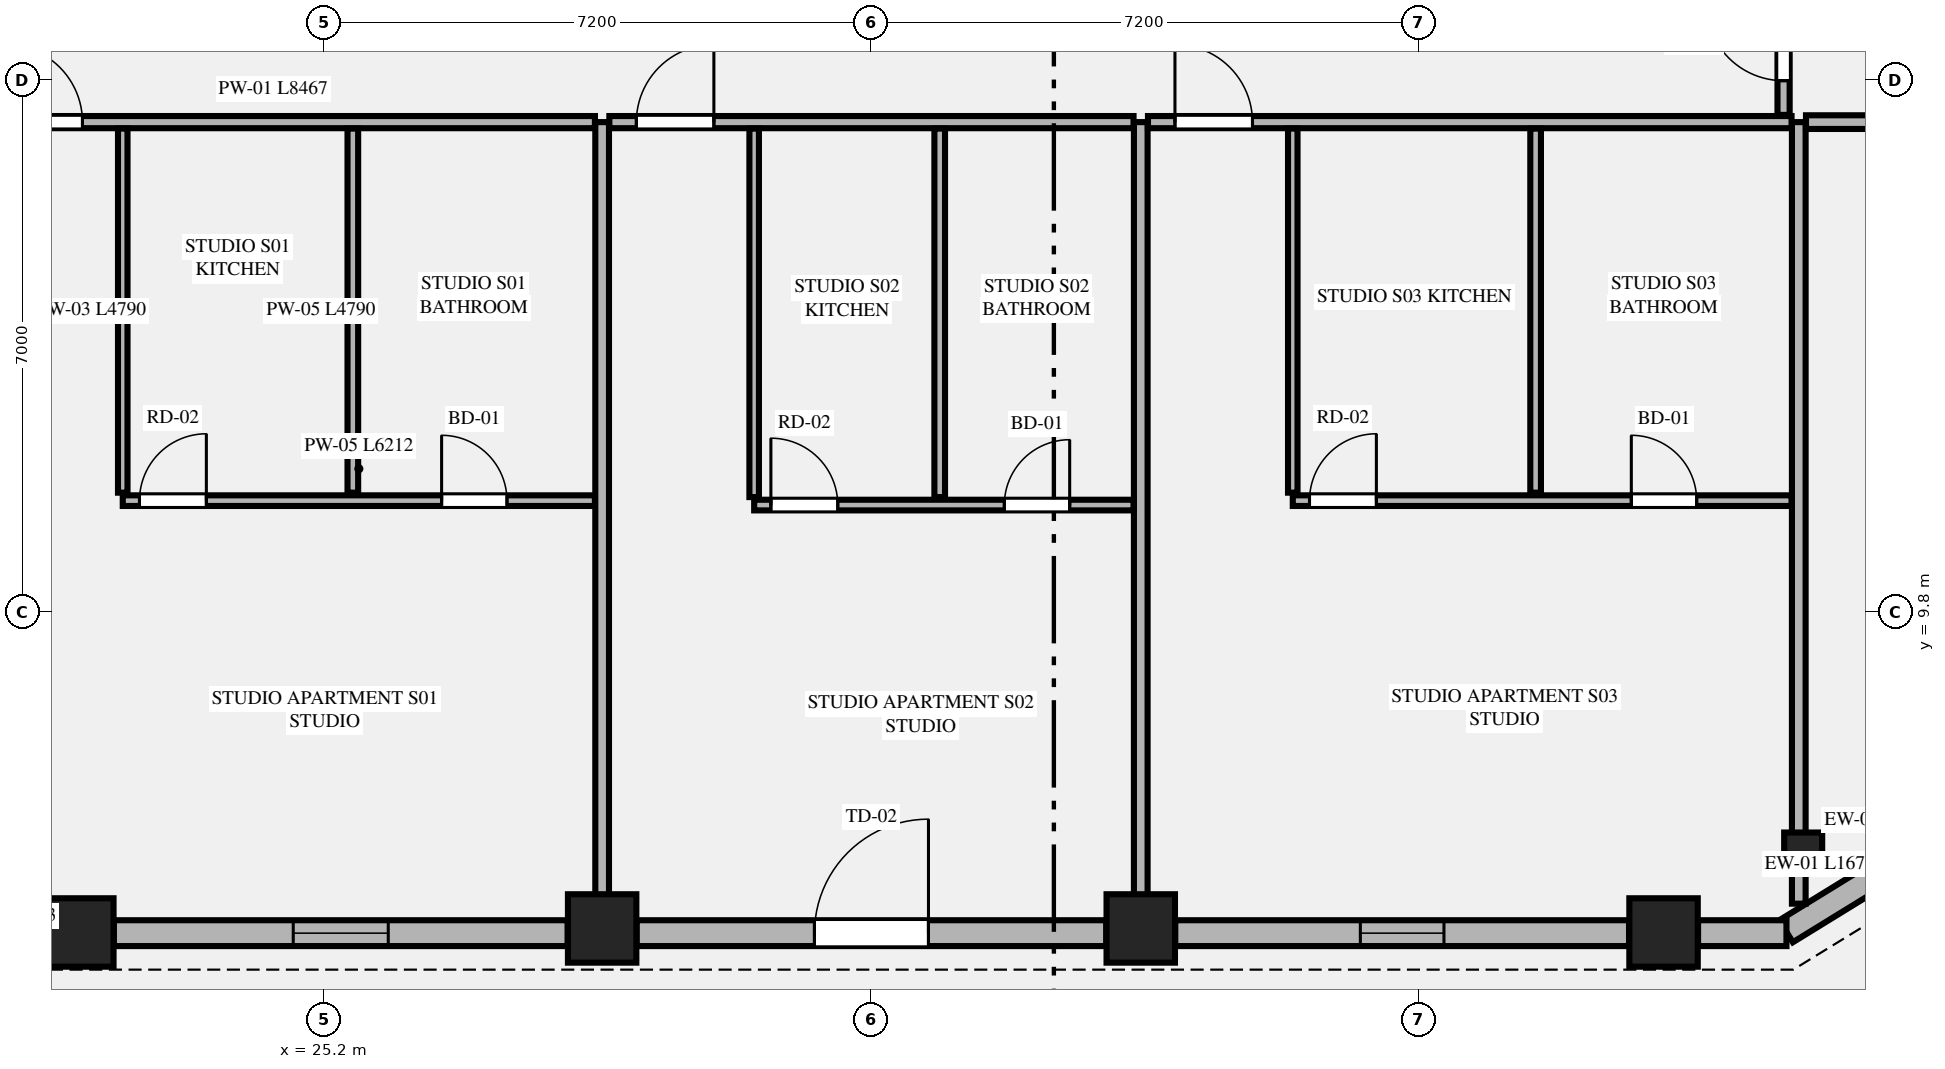
"""IFC4 building model, lengths in metres.
Left out: names, types, materials, properties, quantities, classifications, styles, units other than length and angle.
Written with IfcOpenShell. Run it as: python <this file> out.ifc"""

import sys

from ifc_helpers import new_model, si_unit, direction, frame, frame_2d, origin, origin_2d, place, context, subcontext, project, spatial, rectangle, extrude, element, fill, save


model = new_model("IFC4")
c1 = context("Model", 3, precision=1e-05, world=origin(), true_north=direction((0.0, 1.0)))
c2 = subcontext(c1, "Body", "Model", "MODEL_VIEW")
j1 = project(units=[si_unit("LENGTHUNIT", "METRE"), si_unit("PLANEANGLEUNIT", "RADIAN")], contexts=[c1])
p1 = place(None, origin())
s1 = spatial("IfcSite", under=j1, at=p1, CompositionType="ELEMENT")
p2 = place(p1, origin())
s2 = spatial("IfcBuilding", under=s1, at=p2, CompositionType="ELEMENT")
p3 = place(p2, frame((0.0, 0.0, 171.9)))
s3 = spatial("IfcBuildingStorey", under=s2, at=p3, CompositionType="ELEMENT", Elevation=171.9)
for number, where, z_axis, x_axis in (
    (1, (21.979, 5.589, 0.0), (0.0, 0.0, 1.0), (1.0, 0.0, 0.0)),
    (2, (28.857, 5.642, 0.0), (0.0, 0.0, 1.0), (1.0, 0.0, 0.0)),
    (3, (35.943, 5.642, 0.0), (0.0, 0.0, 1.0), (1.0, 0.0, 0.0)),
    (4, (42.821, 5.589, 0.0), (0.0, 0.0, 1.0), (1.0, 0.0, 0.0)),
):
    element("IfcColumn", number, at=place(p3, frame(where, z_axis=z_axis, x_axis=x_axis)), inside=s3, PredefinedType="COLUMN", context=c2, shape_type="SweptSolid", body=[
        extrude(rectangle(XDim=0.9, YDim=0.9, at=origin_2d()), origin(), (0.0, 0.0, 1.0), 3.55),
    ])
p4 = place(p3, frame((44.658, 6.654, 0.0), z_axis=(0.0, 0.0, 1.0), x_axis=(0.865230187018, 0.501374833306, 0.0)))
e5 = element("IfcColumn", 5, at=p4, inside=s3, PredefinedType="PILASTER", context=c2, shape_type="SweptSolid", body=[
    extrude(rectangle(XDim=0.5, YDim=0.35, at=origin_2d()), origin(), (0.0, 0.0, 1.0), 3.55),
])
p5 = place(p3, frame((44.433, 5.605, 0.0), z_axis=(0.0, 0.0, 1.0), x_axis=(0.851778214877, 0.523902541185, 0.0)))
e6 = element("IfcWall", 6, at=p5, inside=s3, PredefinedType="STANDARD", context=c2, shape_type="SweptSolid", body=[
    extrude(rectangle(XDim=1.678, YDim=0.34, at=frame_2d((0.839, 0.0))), origin(), (0.0, 0.0, 1.0), 3.35),
])
p6 = place(p3, frame((22.433, 5.58, 0.0), z_axis=(0.0, 0.0, 1.0), x_axis=(1.0, 0.0, 0.0)))
e7 = element("IfcWall", 7, at=p6, inside=s3, PredefinedType="STANDARD", context=c2, shape_type="SweptSolid", body=[
    extrude(rectangle(XDim=5.97, YDim=0.34, at=frame_2d((2.985, 0.0))), origin(), (0.0, 0.0, 1.0), 2.883),
])
p7 = place(p6, frame((2.36, 0.0, 0.75)))
e8 = element("IfcOpeningElement", 8, at=p7, cuts=e7, PredefinedType="OPENING", context=c2, shape_type="SweptSolid", body=[
    extrude(rectangle(XDim=1.25, YDim=1.95, at=frame_2d((0.625, 0.975))), frame((0.0, 0.18, 0.0), z_axis=(0.0, -1.0, 0.0), x_axis=(1.0, 0.0, 0.0)), (0.0, 0.0, 1.0), 0.36),
])
p8 = place(p3, frame((29.311, 5.58, 0.0), z_axis=(0.0, 0.0, 1.0), x_axis=(1.0, 0.0, 0.0)))
e9 = element("IfcWall", 9, at=p8, inside=s3, PredefinedType="STANDARD", context=c2, shape_type="SweptSolid", body=[
    extrude(rectangle(XDim=6.178, YDim=0.34, at=frame_2d((3.089, 0.0))), origin(), (0.0, 0.0, 1.0), 2.883),
])
p9 = place(p8, frame((2.339, 0.0, 0.0)))
e10 = element("IfcOpeningElement", 10, at=p9, cuts=e9, PredefinedType="OPENING", context=c2, shape_type="SweptSolid", body=[
    extrude(rectangle(XDim=1.5, YDim=2.3, at=frame_2d((0.75, 1.15))), frame((0.0, 0.18, 0.0), z_axis=(0.0, -1.0, 0.0), x_axis=(1.0, 0.0, 0.0)), (0.0, 0.0, 1.0), 0.36),
])
p10 = place(p3, frame((36.397, 5.58, 0.0), z_axis=(0.0, 0.0, 1.0), x_axis=(1.0, 0.0, 0.0)))
e11 = element("IfcWall", 11, at=p10, inside=s3, PredefinedType="STANDARD", context=c2, shape_type="SweptSolid", body=[
    extrude(rectangle(XDim=5.97, YDim=0.34, at=frame_2d((2.985, 0.0))), origin(), (0.0, 0.0, 1.0), 2.883),
])
p11 = place(p10, frame((2.435, 0.0, 0.75)))
e12 = element("IfcOpeningElement", 12, at=p11, cuts=e11, PredefinedType="OPENING", context=c2, shape_type="SweptSolid", body=[
    extrude(rectangle(XDim=1.1, YDim=1.983, at=frame_2d((0.55, 0.991))), frame((0.0, 0.18, 0.0), z_axis=(0.0, -1.0, 0.0), x_axis=(1.0, 0.0, 0.0)), (0.0, 0.0, 1.0), 0.36),
])
p12 = place(p3, frame((43.275, 5.58, 0.0), z_axis=(0.0, 0.0, 1.0), x_axis=(1.0, 0.0, 0.0)))
e13 = element("IfcWall", 13, at=p12, inside=s3, PredefinedType="STANDARD", context=c2, shape_type="SweptSolid", body=[
    extrude(rectangle(XDim=1.163, YDim=0.34, at=frame_2d((0.582, 0.0))), origin(), (0.0, 0.0, 1.0), 3.35),
])
for number, where, z_axis, x_axis in (
    (14, (28.857, 5.755, 0.0), (0.0, 0.0, 1.0), (0.0, 1.0, 0.0)),
    (15, (35.943, 5.755, 0.0), (0.0, 0.0, 1.0), (0.0, 1.0, 0.0)),
):
    element("IfcWall", number, at=place(p3, frame(where, z_axis=z_axis, x_axis=x_axis)), inside=s3, PredefinedType="PARTITIONING", context=c2, shape_type="SweptSolid", body=[
        extrude(rectangle(XDim=10.495, YDim=0.18, at=frame_2d((5.248, 0.0))), origin(), (0.0, 0.0, 1.0), 2.807),
    ])
p13 = place(p3, frame((44.6, 5.968, 0.0), z_axis=(0.0, 0.0, 1.0), x_axis=(0.0, 1.0, 0.0)))
e16 = element("IfcWall", 16, at=p13, inside=s3, PredefinedType="PARTITIONING", context=c2, shape_type="SweptSolid", body=[
    extrude(rectangle(XDim=10.282, YDim=0.18, at=frame_2d((5.141, 0.0))), origin(), (0.0, 0.0, 1.0), 3.35),
])
p14 = place(p3, frame((20.295, 16.25, 0.0), z_axis=(0.0, 0.0, 1.0), x_axis=(1.0, 0.0, 0.0)))
e17 = element("IfcWall", 17, at=p14, inside=s3, PredefinedType="PARTITIONING", context=c2, shape_type="SweptSolid", body=[
    extrude(rectangle(XDim=8.467, YDim=0.16, at=frame_2d((4.233, 0.0))), origin(), (0.0, 0.0, 1.0), 3.35),
])
p15 = place(p14, frame((0.705, 0.0, 0.0)))
e18 = element("IfcOpeningElement", 18, at=p15, cuts=e17, PredefinedType="OPENING", context=c2, shape_type="SweptSolid", body=[
    extrude(rectangle(XDim=1.02, YDim=2.25, at=frame_2d((0.51, 1.125))), frame((0.0, 0.09, 0.0), z_axis=(0.0, -1.0, 0.0), x_axis=(1.0, 0.0, 0.0)), (0.0, 0.0, 1.0), 0.18),
])
p16 = place(p3, frame((22.55, 11.375, 0.0), z_axis=(0.0, 0.0, 1.0), x_axis=(0.0, 1.0, 0.0)))
e19 = element("IfcWall", 19, at=p16, inside=s3, PredefinedType="PARTITIONING", context=c2, shape_type="SweptSolid", body=[
    extrude(rectangle(XDim=4.79, YDim=0.125, at=frame_2d((2.395, 0.0))), origin(), (0.0, 0.0, 1.0), 2.807),
])
p17 = place(p3, frame((22.55, 11.27, 0.0), z_axis=(0.0, 0.0, 1.0), x_axis=(1.0, 0.0, 0.0)))
e20 = element("IfcWall", 20, at=p17, inside=s3, PredefinedType="PLUMBINGWALL", context=c2, shape_type="SweptSolid", body=[
    extrude(rectangle(XDim=6.212, YDim=0.14, at=frame_2d((3.106, 0.0))), origin(), (0.0, 0.0, 1.0), 3.35),
])
p18 = place(p17, frame((4.195, 0.0, 0.0)))
e21 = element("IfcOpeningElement", 21, at=p18, cuts=e20, PredefinedType="OPENING", context=c2, shape_type="SweptSolid", body=[
    extrude(rectangle(XDim=0.86, YDim=2.1, at=frame_2d((0.43, 1.05))), frame((0.0, 0.08, 0.0), z_axis=(0.0, -1.0, 0.0), x_axis=(1.0, 0.0, 0.0)), (0.0, 0.0, 1.0), 0.16),
])
p19 = place(p17, frame((0.22, 0.0, 0.0)))
e22 = element("IfcOpeningElement", 22, at=p19, cuts=e20, PredefinedType="OPENING", context=c2, shape_type="SweptSolid", body=[
    extrude(rectangle(XDim=0.88, YDim=2.15, at=frame_2d((0.44, 1.075))), frame((0.0, 0.08, 0.0), z_axis=(0.0, -1.0, 0.0), x_axis=(1.0, 0.0, 0.0)), (0.0, 0.0, 1.0), 0.16),
])
p20 = place(p3, frame((25.577, 11.375, 0.0), z_axis=(0.0, 0.0, 1.0), x_axis=(0.0, 1.0, 0.0)))
e23 = element("IfcWall", 23, at=p20, inside=s3, PredefinedType="PLUMBINGWALL", context=c2, shape_type="SweptSolid", body=[
    extrude(rectangle(XDim=4.79, YDim=0.14, at=frame_2d((2.395, 0.0))), origin(), (0.0, 0.0, 1.0), 3.35),
])
p21 = place(p3, frame((28.952, 16.25, 0.0), z_axis=(0.0, 0.0, 1.0), x_axis=(1.0, 0.0, 0.0)))
e24 = element("IfcWall", 24, at=p21, inside=s3, PredefinedType="PARTITIONING", context=c2, shape_type="SweptSolid", body=[
    extrude(rectangle(XDim=6.896, YDim=0.16, at=frame_2d((3.448, 0.0))), origin(), (0.0, 0.0, 1.0), 3.35),
])
p22 = place(p21, frame((0.355, 0.0, 0.0)))
e25 = element("IfcOpeningElement", 25, at=p22, cuts=e24, PredefinedType="OPENING", context=c2, shape_type="SweptSolid", body=[
    extrude(rectangle(XDim=1.02, YDim=2.25, at=frame_2d((0.51, 1.125))), frame((0.0, 0.09, 0.0), z_axis=(0.0, -1.0, 0.0), x_axis=(1.0, 0.0, 0.0)), (0.0, 0.0, 1.0), 0.18),
])
p23 = place(p3, frame((30.857, 11.317, 0.0), z_axis=(0.0, 0.0, 1.0), x_axis=(0.0, 1.0, 0.0)))
e26 = element("IfcWall", 26, at=p23, inside=s3, PredefinedType="PARTITIONING", context=c2, shape_type="SweptSolid", body=[
    extrude(rectangle(XDim=4.848, YDim=0.125, at=frame_2d((2.424, 0.0))), origin(), (0.0, 0.0, 1.0), 3.35),
])
p24 = place(p3, frame((30.857, 11.212, 0.0), z_axis=(0.0, 0.0, 1.0), x_axis=(1.0, 0.0, 0.0)))
e27 = element("IfcWall", 27, at=p24, inside=s3, PredefinedType="PLUMBINGWALL", context=c2, shape_type="SweptSolid", body=[
    extrude(rectangle(XDim=4.991, YDim=0.14, at=frame_2d((2.496, 0.0))), origin(), (0.0, 0.0, 1.0), 3.35),
])
p25 = place(p24, frame((3.291, 0.0, 0.0)))
e28 = element("IfcOpeningElement", 28, at=p25, cuts=e27, PredefinedType="OPENING", context=c2, shape_type="SweptSolid", body=[
    extrude(rectangle(XDim=0.86, YDim=2.1, at=frame_2d((0.43, 1.05))), frame((0.0, 0.08, 0.0), z_axis=(0.0, -1.0, 0.0), x_axis=(1.0, 0.0, 0.0)), (0.0, 0.0, 1.0), 0.16),
])
p26 = place(p24, frame((0.22, 0.0, 0.0)))
e29 = element("IfcOpeningElement", 29, at=p26, cuts=e27, PredefinedType="OPENING", context=c2, shape_type="SweptSolid", body=[
    extrude(rectangle(XDim=0.88, YDim=2.15, at=frame_2d((0.44, 1.075))), frame((0.0, 0.08, 0.0), z_axis=(0.0, -1.0, 0.0), x_axis=(1.0, 0.0, 0.0)), (0.0, 0.0, 1.0), 0.16),
])
p27 = place(p3, frame((33.298, 11.317, 0.0), z_axis=(0.0, 0.0, 1.0), x_axis=(0.0, 1.0, 0.0)))
e30 = element("IfcWall", 30, at=p27, inside=s3, PredefinedType="PLUMBINGWALL", context=c2, shape_type="SweptSolid", body=[
    extrude(rectangle(XDim=4.848, YDim=0.14, at=frame_2d((2.424, 0.0))), origin(), (0.0, 0.0, 1.0), 3.35),
])
p28 = place(p3, frame((36.038, 16.25, 0.0), z_axis=(0.0, 0.0, 1.0), x_axis=(1.0, 0.0, 0.0)))
e31 = element("IfcWall", 31, at=p28, inside=s3, PredefinedType="PARTITIONING", context=c2, shape_type="SweptSolid", body=[
    extrude(rectangle(XDim=8.467, YDim=0.16, at=frame_2d((4.233, 0.0))), origin(), (0.0, 0.0, 1.0), 3.35),
])
p29 = place(p28, frame((0.355, 0.0, 0.0)))
e32 = element("IfcOpeningElement", 32, at=p29, cuts=e31, PredefinedType="OPENING", context=c2, shape_type="SweptSolid", body=[
    extrude(rectangle(XDim=1.02, YDim=2.25, at=frame_2d((0.51, 1.125))), frame((0.0, 0.09, 0.0), z_axis=(0.0, -1.0, 0.0), x_axis=(1.0, 0.0, 0.0)), (0.0, 0.0, 1.0), 0.18),
])
p30 = place(p3, frame((37.943, 11.375, 0.0), z_axis=(0.0, 0.0, 1.0), x_axis=(0.0, 1.0, 0.0)))
e33 = element("IfcWall", 33, at=p30, inside=s3, PredefinedType="PARTITIONING", context=c2, shape_type="SweptSolid", body=[
    extrude(rectangle(XDim=4.79, YDim=0.125, at=frame_2d((2.395, 0.0))), origin(), (0.0, 0.0, 1.0), 3.35),
])
p31 = place(p3, frame((37.943, 11.27, 0.0), z_axis=(0.0, 0.0, 1.0), x_axis=(1.0, 0.0, 0.0)))
e34 = element("IfcWall", 34, at=p31, inside=s3, PredefinedType="PLUMBINGWALL", context=c2, shape_type="SweptSolid", body=[
    extrude(rectangle(XDim=6.562, YDim=0.14, at=frame_2d((3.281, 0.0))), origin(), (0.0, 0.0, 1.0), 3.35),
])
p32 = place(p31, frame((4.454, 0.0, 0.0)))
e35 = element("IfcOpeningElement", 35, at=p32, cuts=e34, PredefinedType="OPENING", context=c2, shape_type="SweptSolid", body=[
    extrude(rectangle(XDim=0.86, YDim=2.1, at=frame_2d((0.43, 1.05))), frame((0.0, 0.08, 0.0), z_axis=(0.0, -1.0, 0.0), x_axis=(1.0, 0.0, 0.0)), (0.0, 0.0, 1.0), 0.16),
])
p33 = place(p31, frame((0.22, 0.0, 0.0)))
e36 = element("IfcOpeningElement", 36, at=p33, cuts=e34, PredefinedType="OPENING", context=c2, shape_type="SweptSolid", body=[
    extrude(rectangle(XDim=0.88, YDim=2.15, at=frame_2d((0.44, 1.075))), frame((0.0, 0.08, 0.0), z_axis=(0.0, -1.0, 0.0), x_axis=(1.0, 0.0, 0.0)), (0.0, 0.0, 1.0), 0.16),
])
p34 = place(p3, frame((41.138, 11.375, 0.0), z_axis=(0.0, 0.0, 1.0), x_axis=(0.0, 1.0, 0.0)))
e37 = element("IfcWall", 37, at=p34, inside=s3, PredefinedType="PLUMBINGWALL", context=c2, shape_type="SweptSolid", body=[
    extrude(rectangle(XDim=4.79, YDim=0.14, at=frame_2d((2.395, 0.0))), origin(), (0.0, 0.0, 1.0), 3.35),
])
p35 = place(p3, frame((44.695, 16.25, 0.0), z_axis=(0.0, 0.0, 1.0), x_axis=(1.0, 0.0, 0.0)))
e38 = element("IfcWall", 38, at=p35, inside=s3, PredefinedType="PARTITIONING", context=c2, shape_type="SweptSolid", body=[
    extrude(rectangle(XDim=5.894, YDim=0.18, at=frame_2d((2.947, 0.0))), origin(), (0.0, 0.0, 1.0), 3.35),
])
p36 = place(p3, frame((44.4, 16.345, 0.0), z_axis=(0.0, 0.0, 1.0), x_axis=(0.0, 1.0, 0.0)))
e39 = element("IfcWall", 39, at=p36, inside=s3, PredefinedType="PARTITIONING", context=c2, shape_type="SweptSolid", body=[
    extrude(rectangle(XDim=18.71, YDim=0.16, at=frame_2d((9.355, 0.0))), origin(), (0.0, 0.0, 1.0), 3.35),
])
p37 = place(p36, frame((0.45, 0.0, 0.0)))
e40 = element("IfcOpeningElement", 40, at=p37, cuts=e39, PredefinedType="OPENING", context=c2, shape_type="SweptSolid", body=[
    extrude(rectangle(XDim=1.02, YDim=2.25, at=frame_2d((0.51, 1.125))), frame((0.0, 0.09, 0.0), z_axis=(0.0, -1.0, 0.0), x_axis=(1.0, 0.0, 0.0)), (0.0, 0.0, 1.0), 0.18),
])
p38 = place(p7, origin())
e41 = element("IfcWindow", 41, at=p38, inside=s3, PartitioningType="SINGLE_PANEL", PredefinedType="WINDOW", context=c2, shape_type="SweptSolid", body=[
    extrude(rectangle(XDim=1.25, YDim=1.95, at=frame_2d((0.625, 0.975))), frame((0.0, 0.03, 0.0), z_axis=(0.0, -1.0, 0.0), x_axis=(1.0, 0.0, 0.0)), (0.0, 0.0, 1.0), 0.06),
])
fill(e8, e41)
p39 = place(p9, origin())
e42 = element("IfcDoor", 42, at=p39, inside=s3, OperationType="SINGLE_SWING_RIGHT", PredefinedType="DOOR", context=c2, shape_type="SweptSolid", body=[
    extrude(rectangle(XDim=1.5, YDim=2.3, at=frame_2d((0.75, 1.15))), frame((0.0, 0.025, 0.0), z_axis=(0.0, -1.0, 0.0), x_axis=(1.0, 0.0, 0.0)), (0.0, 0.0, 1.0), 0.05),
])
fill(e10, e42)
p40 = place(p11, origin())
e43 = element("IfcWindow", 43, at=p40, inside=s3, PartitioningType="SINGLE_PANEL", PredefinedType="WINDOW", context=c2, shape_type="SweptSolid", body=[
    extrude(rectangle(XDim=1.1, YDim=1.983, at=frame_2d((0.55, 0.991))), frame((0.0, 0.03, 0.0), z_axis=(0.0, -1.0, 0.0), x_axis=(1.0, 0.0, 0.0)), (0.0, 0.0, 1.0), 0.06),
])
fill(e12, e43)
p41 = place(p18, origin())
e44 = element("IfcDoor", 44, at=p41, inside=s3, OperationType="SINGLE_SWING_LEFT", PredefinedType="DOOR", context=c2, shape_type="SweptSolid", body=[
    extrude(rectangle(XDim=0.86, YDim=2.1, at=frame_2d((0.43, 1.05))), frame((0.0, 0.025, 0.0), z_axis=(0.0, -1.0, 0.0), x_axis=(1.0, 0.0, 0.0)), (0.0, 0.0, 1.0), 0.05),
])
fill(e21, e44)
p42 = place(p15, origin())
e45 = element("IfcDoor", 45, at=p42, inside=s3, OperationType="SINGLE_SWING_LEFT", PredefinedType="DOOR", context=c2, shape_type="SweptSolid", body=[
    extrude(rectangle(XDim=1.02, YDim=2.25, at=frame_2d((0.51, 1.125))), frame((0.0, 0.025, 0.0), z_axis=(0.0, -1.0, 0.0), x_axis=(1.0, 0.0, 0.0)), (0.0, 0.0, 1.0), 0.05),
])
fill(e18, e45)
p43 = place(p19, origin())
e46 = element("IfcDoor", 46, at=p43, inside=s3, OperationType="SINGLE_SWING_RIGHT", PredefinedType="DOOR", context=c2, shape_type="SweptSolid", body=[
    extrude(rectangle(XDim=0.88, YDim=2.15, at=frame_2d((0.44, 1.075))), frame((0.0, 0.025, 0.0), z_axis=(0.0, -1.0, 0.0), x_axis=(1.0, 0.0, 0.0)), (0.0, 0.0, 1.0), 0.05),
])
fill(e22, e46)
p44 = place(p25, origin())
e47 = element("IfcDoor", 47, at=p44, inside=s3, OperationType="SINGLE_SWING_RIGHT", PredefinedType="DOOR", context=c2, shape_type="SweptSolid", body=[
    extrude(rectangle(XDim=0.86, YDim=2.1, at=frame_2d((0.43, 1.05))), frame((0.0, 0.025, 0.0), z_axis=(0.0, -1.0, 0.0), x_axis=(1.0, 0.0, 0.0)), (0.0, 0.0, 1.0), 0.05),
])
fill(e28, e47)
p45 = place(p22, origin())
e48 = element("IfcDoor", 48, at=p45, inside=s3, OperationType="SINGLE_SWING_RIGHT", PredefinedType="DOOR", context=c2, shape_type="SweptSolid", body=[
    extrude(rectangle(XDim=1.02, YDim=2.25, at=frame_2d((0.51, 1.125))), frame((0.0, 0.025, 0.0), z_axis=(0.0, -1.0, 0.0), x_axis=(1.0, 0.0, 0.0)), (0.0, 0.0, 1.0), 0.05),
])
fill(e25, e48)
p46 = place(p26, origin())
e49 = element("IfcDoor", 49, at=p46, inside=s3, OperationType="SINGLE_SWING_LEFT", PredefinedType="DOOR", context=c2, shape_type="SweptSolid", body=[
    extrude(rectangle(XDim=0.88, YDim=2.15, at=frame_2d((0.44, 1.075))), frame((0.0, 0.025, 0.0), z_axis=(0.0, -1.0, 0.0), x_axis=(1.0, 0.0, 0.0)), (0.0, 0.0, 1.0), 0.05),
])
fill(e29, e49)
p47 = place(p32, origin())
e50 = element("IfcDoor", 50, at=p47, inside=s3, OperationType="SINGLE_SWING_LEFT", PredefinedType="DOOR", context=c2, shape_type="SweptSolid", body=[
    extrude(rectangle(XDim=0.86, YDim=2.1, at=frame_2d((0.43, 1.05))), frame((0.0, 0.025, 0.0), z_axis=(0.0, -1.0, 0.0), x_axis=(1.0, 0.0, 0.0)), (0.0, 0.0, 1.0), 0.05),
])
fill(e35, e50)
p48 = place(p29, origin())
e51 = element("IfcDoor", 51, at=p48, inside=s3, OperationType="SINGLE_SWING_LEFT", PredefinedType="DOOR", context=c2, shape_type="SweptSolid", body=[
    extrude(rectangle(XDim=1.02, YDim=2.25, at=frame_2d((0.51, 1.125))), frame((0.0, 0.025, 0.0), z_axis=(0.0, -1.0, 0.0), x_axis=(1.0, 0.0, 0.0)), (0.0, 0.0, 1.0), 0.05),
])
fill(e32, e51)
p49 = place(p33, origin())
e52 = element("IfcDoor", 52, at=p49, inside=s3, OperationType="SINGLE_SWING_RIGHT", PredefinedType="DOOR", context=c2, shape_type="SweptSolid", body=[
    extrude(rectangle(XDim=0.88, YDim=2.15, at=frame_2d((0.44, 1.075))), frame((0.0, 0.025, 0.0), z_axis=(0.0, -1.0, 0.0), x_axis=(1.0, 0.0, 0.0)), (0.0, 0.0, 1.0), 0.05),
])
fill(e36, e52)
p50 = place(p37, origin())
e53 = element("IfcDoor", 53, at=p50, inside=s3, OperationType="SINGLE_SWING_RIGHT", PredefinedType="DOOR", context=c2, shape_type="SweptSolid", body=[
    extrude(rectangle(XDim=1.02, YDim=2.25, at=frame_2d((0.51, 1.125))), frame((0.0, 0.025, 0.0), z_axis=(0.0, -1.0, 0.0), x_axis=(1.0, 0.0, 0.0)), (0.0, 0.0, 1.0), 0.05),
])
fill(e40, e53)
save(model, sys.argv[1])
